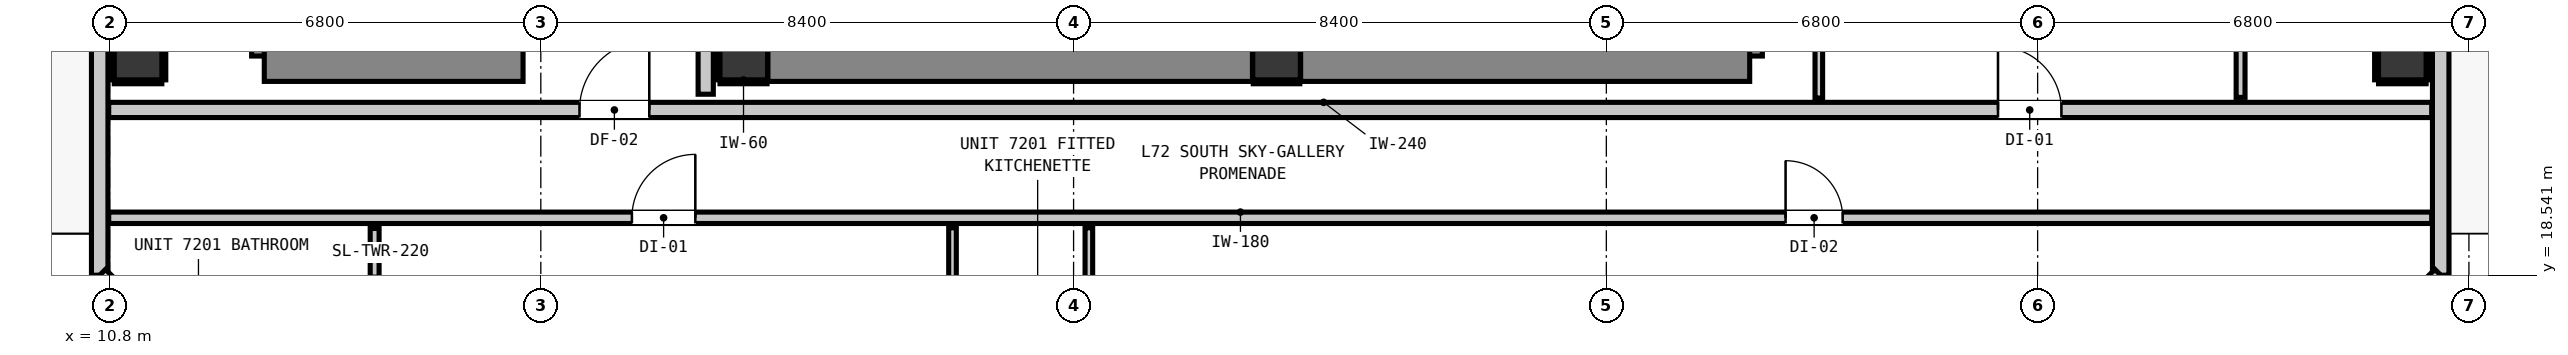
"""IFC4 building model, lengths in metres.
Left out: names, types, materials, properties, quantities, classifications, styles, units other than length and angle.
Written with IfcOpenShell. Run it as: python <this file> out.ifc"""

import sys

from ifc_helpers import new_model, si_unit, direction, frame, frame_2d, origin, origin_2d, place, context, subcontext, project, spatial, rectangle, extrude, element, fill, save


model = new_model("IFC4")
c1 = context("Model", 3, precision=1e-05, world=origin(), true_north=direction((0.0, 1.0)))
c2 = subcontext(c1, "Body", "Model", "MODEL_VIEW")
j1 = project(units=[si_unit("LENGTHUNIT", "METRE"), si_unit("PLANEANGLEUNIT", "RADIAN")], contexts=[c1])
p1 = place(None, origin())
s1 = spatial("IfcSite", under=j1, at=p1, CompositionType="ELEMENT")
p2 = place(p1, origin())
s2 = spatial("IfcBuilding", under=s1, at=p2, CompositionType="ELEMENT")
p3 = place(p2, frame((0.0, 0.0, 247.88)))
s3 = spatial("IfcBuildingStorey", under=s2, at=p3, CompositionType="ELEMENT", Elevation=247.88)
for number, where, z_axis, x_axis in (
    (1, (20.8, 22.0, 0.0), (0.0, 0.0, 1.0), (1.0, 0.0, 0.0)),
    (2, (29.2, 22.0, 0.0), (0.0, 0.0, 1.0), (1.0, 0.0, 0.0)),
):
    element("IfcColumn", number, at=place(p3, frame(where, z_axis=z_axis, x_axis=x_axis)), inside=s3, PredefinedType="COLUMN", context=c2, shape_type="SweptSolid", body=[
        extrude(rectangle(XDim=0.75, YDim=0.75, at=origin_2d()), origin(), (0.0, 0.0, 1.0), 3.32),
    ])
p4 = place(p3, frame((13.44, 22.0, 0.0), z_axis=(0.0, 0.0, 1.0), x_axis=(0.0, 1.0, 0.0)))
e3 = element("IfcWall", 3, at=p4, inside=s3, PredefinedType="SHEAR", context=c2, shape_type="SweptSolid", body=[
    extrude(rectangle(XDim=8.32, YDim=0.8, at=frame_2d((4.16, 0.0))), origin(), (0.0, 0.0, 1.0), 3.32),
])
p5 = place(p3, frame((13.24, 22.0, 0.0), z_axis=(0.0, 0.0, 1.0), x_axis=(1.0, 0.0, 0.0)))
e4 = element("IfcWall", 4, at=p5, inside=s3, PredefinedType="SHEAR", context=c2, shape_type="SweptSolid", body=[
    extrude(rectangle(XDim=4.08, YDim=0.8, at=frame_2d((2.04, 0.0))), origin(), (0.0, 0.0, 1.0), 3.32),
])
p6 = place(p3, frame((36.46, 22.0, 0.0), z_axis=(0.0, 0.0, 1.0), x_axis=(0.0, 1.0, 0.0)))
e5 = element("IfcWall", 5, at=p6, inside=s3, PredefinedType="SHEAR", context=c2, shape_type="SweptSolid", body=[
    extrude(rectangle(XDim=8.32, YDim=0.8, at=frame_2d((4.16, 0.0))), origin(), (0.0, 0.0, 1.0), 3.32),
])
p7 = place(p3, frame((29.58, 22.0, 0.0), z_axis=(0.0, 0.0, 1.0), x_axis=(1.0, 0.0, 0.0)))
e6 = element("IfcWall", 6, at=p7, inside=s3, PredefinedType="SHEAR", context=c2, shape_type="SweptSolid", body=[
    extrude(rectangle(XDim=7.08, YDim=0.8, at=frame_2d((3.54, 0.0))), origin(), (0.0, 0.0, 1.0), 3.32),
])
p8 = place(p3, frame((21.18, 22.0, 0.0), z_axis=(0.0, 0.0, 1.0), x_axis=(1.0, 0.0, 0.0)))
e7 = element("IfcWall", 7, at=p8, inside=s3, PredefinedType="SHEAR", context=c2, shape_type="SweptSolid", body=[
    extrude(rectangle(XDim=7.64, YDim=0.8, at=frame_2d((3.82, 0.0))), origin(), (0.0, 0.0, 1.0), 3.32),
])
for number, where, z_axis, x_axis in (
    (8, (11.25, 22.0, 0.0), (0.0, 0.0, 1.0), (1.0, 0.0, 0.0)),
    (9, (46.95, 22.0, 0.0), (0.0, 0.0, 1.0), (1.0, 0.0, 0.0)),
):
    element("IfcColumn", number, at=place(p3, frame(where, z_axis=z_axis, x_axis=x_axis)), inside=s3, PredefinedType="COLUMN", context=c2, shape_type="SweptSolid", body=[
        extrude(rectangle(XDim=0.75, YDim=0.75, at=origin_2d()), origin(), (0.0, 0.0, 1.0), 2.9),
    ])
p9 = place(p3, frame((10.645, 18.545, 0.0), z_axis=(0.0, 0.0, 1.0), x_axis=(0.0, 1.0, 0.0)))
e10 = element("IfcWall", 10, at=p9, inside=s3, PredefinedType="STANDARD", context=c2, shape_type="SweptSolid", body=[
    extrude(rectangle(XDim=30.31, YDim=0.26, at=frame_2d((15.155, 0.0))), origin(), (0.0, 0.0, 1.0), 2.9),
])
p10 = place(p9, frame((24.171, 0.0, 0.0)))
e11 = element("IfcOpeningElement", 11, at=p10, cuts=e10, PredefinedType="OPENING", context=c2, shape_type="SweptSolid", body=[
    extrude(rectangle(XDim=1.0, YDim=2.15, at=frame_2d((0.5, 1.075))), frame((0.0, 0.14, 0.0), z_axis=(0.0, -1.0, 0.0), x_axis=(1.0, 0.0, 0.0)), (0.0, 0.0, 1.0), 0.28),
])
p11 = place(p9, frame((27.045, 0.0, 0.85)))
e12 = element("IfcOpeningElement", 12, at=p11, cuts=e10, PredefinedType="OPENING", context=c2, shape_type="SweptSolid", body=[
    extrude(rectangle(XDim=1.5, YDim=1.8, at=frame_2d((0.75, 0.9))), frame((0.0, 0.14, 0.0), z_axis=(0.0, -1.0, 0.0), x_axis=(1.0, 0.0, 0.0)), (0.0, 0.0, 1.0), 0.28),
])
p12 = place(p3, frame((47.555, 48.855, 0.0), z_axis=(0.0, 0.0, 1.0), x_axis=(0.0, -1.0, 0.0)))
e13 = element("IfcWall", 13, at=p12, inside=s3, PredefinedType="STANDARD", context=c2, shape_type="SweptSolid", body=[
    extrude(rectangle(XDim=30.31, YDim=0.26, at=frame_2d((15.155, 0.0))), origin(), (0.0, 0.0, 1.0), 2.9),
])
p13 = place(p12, frame((3.729, 0.0, 0.0)))
e14 = element("IfcOpeningElement", 14, at=p13, cuts=e13, PredefinedType="OPENING", context=c2, shape_type="SweptSolid", body=[
    extrude(rectangle(XDim=1.0, YDim=2.15, at=frame_2d((0.5, 1.075))), frame((0.0, 0.14, 0.0), z_axis=(0.0, -1.0, 0.0), x_axis=(1.0, 0.0, 0.0)), (0.0, 0.0, 1.0), 0.28),
])
for number, where, z_axis, x_axis in (
    (15, (47.555, 18.545, 0.0), (0.0, 0.0, 1.0), (-0.707, -0.707, 0.0)),
    (16, (12.745, 16.445, 0.0), (0.0, 0.0, 1.0), (-0.707, 0.707, 0.0)),
):
    element("IfcWall", number, at=place(p3, frame(where, z_axis=z_axis, x_axis=x_axis)), inside=s3, PredefinedType="STANDARD", context=c2, shape_type="SweptSolid", body=[
        extrude(rectangle(XDim=2.97, YDim=0.26, at=frame_2d((1.485, 0.0))), origin(), (0.0, 0.0, 1.0), 2.9),
    ])
p14 = place(p3, frame((10.787, 21.15, 0.0), z_axis=(0.0, 0.0, 1.0), x_axis=(1.0, 0.0, 0.0)))
e17 = element("IfcWall", 17, at=p14, inside=s3, PredefinedType="PARTITIONING", context=c2, shape_type="SweptSolid", body=[
    extrude(rectangle(XDim=36.626, YDim=0.24, at=frame_2d((18.313, 0.0))), origin(), (0.0, 0.0, 1.0), 2.9),
])
p15 = place(p14, frame((7.423, 0.0, 0.0)))
e18 = element("IfcOpeningElement", 18, at=p15, cuts=e17, PredefinedType="OPENING", context=c2, shape_type="SweptSolid", body=[
    extrude(rectangle(XDim=1.1, YDim=2.15, at=frame_2d((0.55, 1.075))), frame((0.0, 0.13, 0.0), z_axis=(0.0, -1.0, 0.0), x_axis=(1.0, 0.0, 0.0)), (0.0, 0.0, 1.0), 0.26),
])
p16 = place(p14, frame((29.788, 0.0, 0.0)))
e19 = element("IfcOpeningElement", 19, at=p16, cuts=e17, PredefinedType="OPENING", context=c2, shape_type="SweptSolid", body=[
    extrude(rectangle(XDim=1.0, YDim=2.15, at=frame_2d((0.5, 1.075))), frame((0.0, 0.13, 0.0), z_axis=(0.0, -1.0, 0.0), x_axis=(1.0, 0.0, 0.0)), (0.0, 0.0, 1.0), 0.26),
])
p17 = place(p3, frame((10.787, 19.45, 0.0), z_axis=(0.0, 0.0, 1.0), x_axis=(1.0, 0.0, 0.0)))
e20 = element("IfcWall", 20, at=p17, inside=s3, PredefinedType="PARTITIONING", context=c2, shape_type="SweptSolid", body=[
    extrude(rectangle(XDim=36.626, YDim=0.18, at=frame_2d((18.313, 0.0))), origin(), (0.0, 0.0, 1.0), 2.9),
])
p18 = place(p17, frame((8.249, 0.0, 0.0)))
e21 = element("IfcOpeningElement", 21, at=p18, cuts=e20, PredefinedType="OPENING", context=c2, shape_type="SweptSolid", body=[
    extrude(rectangle(XDim=1.0, YDim=2.15, at=frame_2d((0.5, 1.075))), frame((0.0, 0.1, 0.0), z_axis=(0.0, -1.0, 0.0), x_axis=(1.0, 0.0, 0.0)), (0.0, 0.0, 1.0), 0.2),
])
p19 = place(p17, frame((26.439, 0.0, 0.0)))
e22 = element("IfcOpeningElement", 22, at=p19, cuts=e20, PredefinedType="OPENING", context=c2, shape_type="SweptSolid", body=[
    extrude(rectangle(XDim=0.9, YDim=2.1, at=frame_2d((0.45, 1.05))), frame((0.0, 0.1, 0.0), z_axis=(0.0, -1.0, 0.0), x_axis=(1.0, 0.0, 0.0)), (0.0, 0.0, 1.0), 0.2),
])
p20 = place(p3, frame((20.2, 21.398, 0.0), z_axis=(0.0, 0.0, 1.0), x_axis=(0.0, 1.0, 0.0)))
e23 = element("IfcWall", 23, at=p20, inside=s3, PredefinedType="PARTITIONING", context=c2, shape_type="SweptSolid", body=[
    extrude(rectangle(XDim=6.754, YDim=0.24, at=frame_2d((3.377, 0.0))), origin(), (0.0, 0.0, 1.0), 0.905),
])
p21 = place(p3, frame((14.98, 16.587, 0.0), z_axis=(0.0, 0.0, 1.0), x_axis=(0.0, 1.0, 0.0)))
e24 = element("IfcWall", 24, at=p21, inside=s3, PredefinedType="PARTITIONING", context=c2, shape_type="SweptSolid", body=[
    extrude(rectangle(XDim=2.695, YDim=0.14, at=frame_2d((1.348, 0.0))), origin(), (0.0, 0.0, 1.0), 2.9),
])
p22 = place(p21, frame((1.088, 0.0, 0.0)))
e25 = element("IfcOpeningElement", 25, at=p22, cuts=e24, PredefinedType="OPENING", context=c2, shape_type="SweptSolid", body=[
    extrude(rectangle(XDim=0.86, YDim=2.02, at=frame_2d((0.43, 1.01))), frame((0.0, 0.08, 0.0), z_axis=(0.0, -1.0, 0.0), x_axis=(1.0, 0.0, 0.0)), (0.0, 0.0, 1.0), 0.16),
])
p23 = place(p3, frame((44.4, 21.348, 0.0), z_axis=(0.0, 0.0, 1.0), x_axis=(0.0, 1.0, 0.0)))
e26 = element("IfcWall", 26, at=p23, inside=s3, PredefinedType="PARTITIONING", context=c2, shape_type="SweptSolid", body=[
    extrude(rectangle(XDim=5.304, YDim=0.14, at=frame_2d((2.652, 0.0))), origin(), (0.0, 0.0, 1.0), 2.9),
])
p24 = place(p23, frame((2.19, 0.0, 0.0)))
e27 = element("IfcOpeningElement", 27, at=p24, cuts=e26, PredefinedType="OPENING", context=c2, shape_type="SweptSolid", body=[
    extrude(rectangle(XDim=0.9, YDim=2.1, at=frame_2d((0.45, 1.05))), frame((0.0, 0.08, 0.0), z_axis=(0.0, -1.0, 0.0), x_axis=(1.0, 0.0, 0.0)), (0.0, 0.0, 1.0), 0.16),
])
p25 = place(p3, frame((24.091, 16.587, 0.0), z_axis=(0.0, 0.0, 1.0), x_axis=(0.0, 1.0, 0.0)))
e28 = element("IfcWall", 28, at=p25, inside=s3, PredefinedType="PARTITIONING", context=c2, shape_type="SweptSolid", body=[
    extrude(rectangle(XDim=2.705, YDim=0.12, at=frame_2d((1.353, 0.0))), origin(), (0.0, 0.0, 1.0), 2.9),
])
p26 = place(p25, frame((0.988, 0.0, 0.0)))
e29 = element("IfcOpeningElement", 29, at=p26, cuts=e28, PredefinedType="OPENING", context=c2, shape_type="SweptSolid", body=[
    extrude(rectangle(XDim=0.9, YDim=2.1, at=frame_2d((0.45, 1.05))), frame((0.0, 0.07, 0.0), z_axis=(0.0, -1.0, 0.0), x_axis=(1.0, 0.0, 0.0)), (0.0, 0.0, 1.0), 0.14),
])
p27 = place(p3, frame((26.241, 16.587, 0.0), z_axis=(0.0, 0.0, 1.0), x_axis=(0.0, 1.0, 0.0)))
e30 = element("IfcWall", 30, at=p27, inside=s3, PredefinedType="PARTITIONING", context=c2, shape_type="SweptSolid", body=[
    extrude(rectangle(XDim=2.705, YDim=0.12, at=frame_2d((1.353, 0.0))), origin(), (0.0, 0.0, 1.0), 2.9),
])
p28 = place(p3, frame((37.75, 21.338, 0.0), z_axis=(0.0, 0.0, 1.0), x_axis=(0.0, 1.0, 0.0)))
e31 = element("IfcWall", 31, at=p28, inside=s3, PredefinedType="PARTITIONING", context=c2, shape_type="SweptSolid", body=[
    extrude(rectangle(XDim=10.524, YDim=0.12, at=frame_2d((5.262, 0.0))), origin(), (0.0, 0.0, 1.0), 2.9),
])
p29 = place(p3, frame((20.425, 21.593, 0.0), z_axis=(0.0, 0.0, 1.0), x_axis=(1.0, 0.0, 0.0)))
e32 = element("IfcWall", 32, at=p29, inside=s3, PredefinedType="PARTITIONING", context=c2, shape_type="SweptSolid", body=[
    extrude(rectangle(XDim=0.742, YDim=0.06, at=frame_2d((0.371, 0.0))), origin(), (0.0, 0.0, 1.0), 0.905),
])
p30 = place(p3, frame((20.393, 21.625, 0.0), z_axis=(0.0, 0.0, 1.0), x_axis=(0.0, 1.0, 0.0)))
e33 = element("IfcWall", 33, at=p30, inside=s3, PredefinedType="PARTITIONING", context=c2, shape_type="SweptSolid", body=[
    extrude(rectangle(XDim=0.75, YDim=0.06, at=frame_2d((0.375, 0.0))), origin(), (0.0, 0.0, 1.0), 0.905),
])
p31 = place(p3, frame((28.833, 21.593, 0.0), z_axis=(0.0, 0.0, 1.0), x_axis=(1.0, 0.0, 0.0)))
e34 = element("IfcWall", 34, at=p31, inside=s3, PredefinedType="PARTITIONING", context=c2, shape_type="SweptSolid", body=[
    extrude(rectangle(XDim=0.734, YDim=0.06, at=frame_2d((0.367, 0.0))), origin(), (0.0, 0.0, 1.0), 0.905),
])
p32 = place(p3, frame((10.875, 21.593, 0.0), z_axis=(0.0, 0.0, 1.0), x_axis=(1.0, 0.0, 0.0)))
e35 = element("IfcWall", 35, at=p32, inside=s3, PredefinedType="PARTITIONING", context=c2, shape_type="SweptSolid", body=[
    extrude(rectangle(XDim=0.75, YDim=0.06, at=frame_2d((0.375, 0.0))), origin(), (0.0, 0.0, 1.0), 0.905),
])
for number, where, z_axis, x_axis in (
    (36, (10.843, 21.625, 0.0), (0.0, 0.0, 1.0), (0.0, 1.0, 0.0)),
    (37, (11.657, 21.625, 0.0), (0.0, 0.0, 1.0), (0.0, 1.0, 0.0)),
):
    element("IfcWall", number, at=place(p3, frame(where, z_axis=z_axis, x_axis=x_axis)), inside=s3, PredefinedType="PARTITIONING", context=c2, shape_type="SweptSolid", body=[
        extrude(rectangle(XDim=0.75, YDim=0.06, at=frame_2d((0.375, 0.0))), origin(), (0.0, 0.0, 1.0), 1.45),
    ])
p33 = place(p3, frame((46.575, 21.593, 0.0), z_axis=(0.0, 0.0, 1.0), x_axis=(1.0, 0.0, 0.0)))
e38 = element("IfcWall", 38, at=p33, inside=s3, PredefinedType="PARTITIONING", context=c2, shape_type="SweptSolid", body=[
    extrude(rectangle(XDim=0.75, YDim=0.06, at=frame_2d((0.375, 0.0))), origin(), (0.0, 0.0, 1.0), 0.905),
])
for number, where, z_axis, x_axis in (
    (39, (46.543, 21.625, 0.0), (0.0, 0.0, 1.0), (0.0, 1.0, 0.0)),
    (40, (47.357, 21.625, 0.0), (0.0, 0.0, 1.0), (0.0, 1.0, 0.0)),
):
    element("IfcWall", number, at=place(p3, frame(where, z_axis=z_axis, x_axis=x_axis)), inside=s3, PredefinedType="PARTITIONING", context=c2, shape_type="SweptSolid", body=[
        extrude(rectangle(XDim=0.75, YDim=0.06, at=frame_2d((0.375, 0.0))), origin(), (0.0, 0.0, 1.0), 1.45),
    ])
p34 = place(p15, origin())
e41 = element("IfcDoor", 41, at=p34, inside=s3, OperationType="SINGLE_SWING_RIGHT", PredefinedType="DOOR", context=c2, shape_type="SweptSolid", body=[
    extrude(rectangle(XDim=1.1, YDim=2.15, at=frame_2d((0.55, 1.075))), frame((0.0, 0.025, 0.0), z_axis=(0.0, -1.0, 0.0), x_axis=(1.0, 0.0, 0.0)), (0.0, 0.0, 1.0), 0.05),
])
fill(e18, e41)
p35 = place(p18, origin())
e42 = element("IfcDoor", 42, at=p35, inside=s3, OperationType="SINGLE_SWING_RIGHT", PredefinedType="DOOR", context=c2, shape_type="SweptSolid", body=[
    extrude(rectangle(XDim=1.0, YDim=2.15, at=frame_2d((0.5, 1.075))), frame((0.0, 0.025, 0.0), z_axis=(0.0, -1.0, 0.0), x_axis=(1.0, 0.0, 0.0)), (0.0, 0.0, 1.0), 0.05),
])
fill(e21, e42)
p36 = place(p19, origin())
e43 = element("IfcDoor", 43, at=p36, inside=s3, OperationType="SINGLE_SWING_LEFT", PredefinedType="DOOR", context=c2, shape_type="SweptSolid", body=[
    extrude(rectangle(XDim=0.9, YDim=2.1, at=frame_2d((0.45, 1.05))), frame((0.0, 0.025, 0.0), z_axis=(0.0, -1.0, 0.0), x_axis=(1.0, 0.0, 0.0)), (0.0, 0.0, 1.0), 0.05),
])
fill(e22, e43)
p37 = place(p16, origin())
e44 = element("IfcDoor", 44, at=p37, inside=s3, OperationType="SINGLE_SWING_LEFT", PredefinedType="DOOR", context=c2, shape_type="SweptSolid", body=[
    extrude(rectangle(XDim=1.0, YDim=2.15, at=frame_2d((0.5, 1.075))), frame((0.0, 0.025, 0.0), z_axis=(0.0, -1.0, 0.0), x_axis=(1.0, 0.0, 0.0)), (0.0, 0.0, 1.0), 0.05),
])
fill(e19, e44)
save(model, sys.argv[1])
